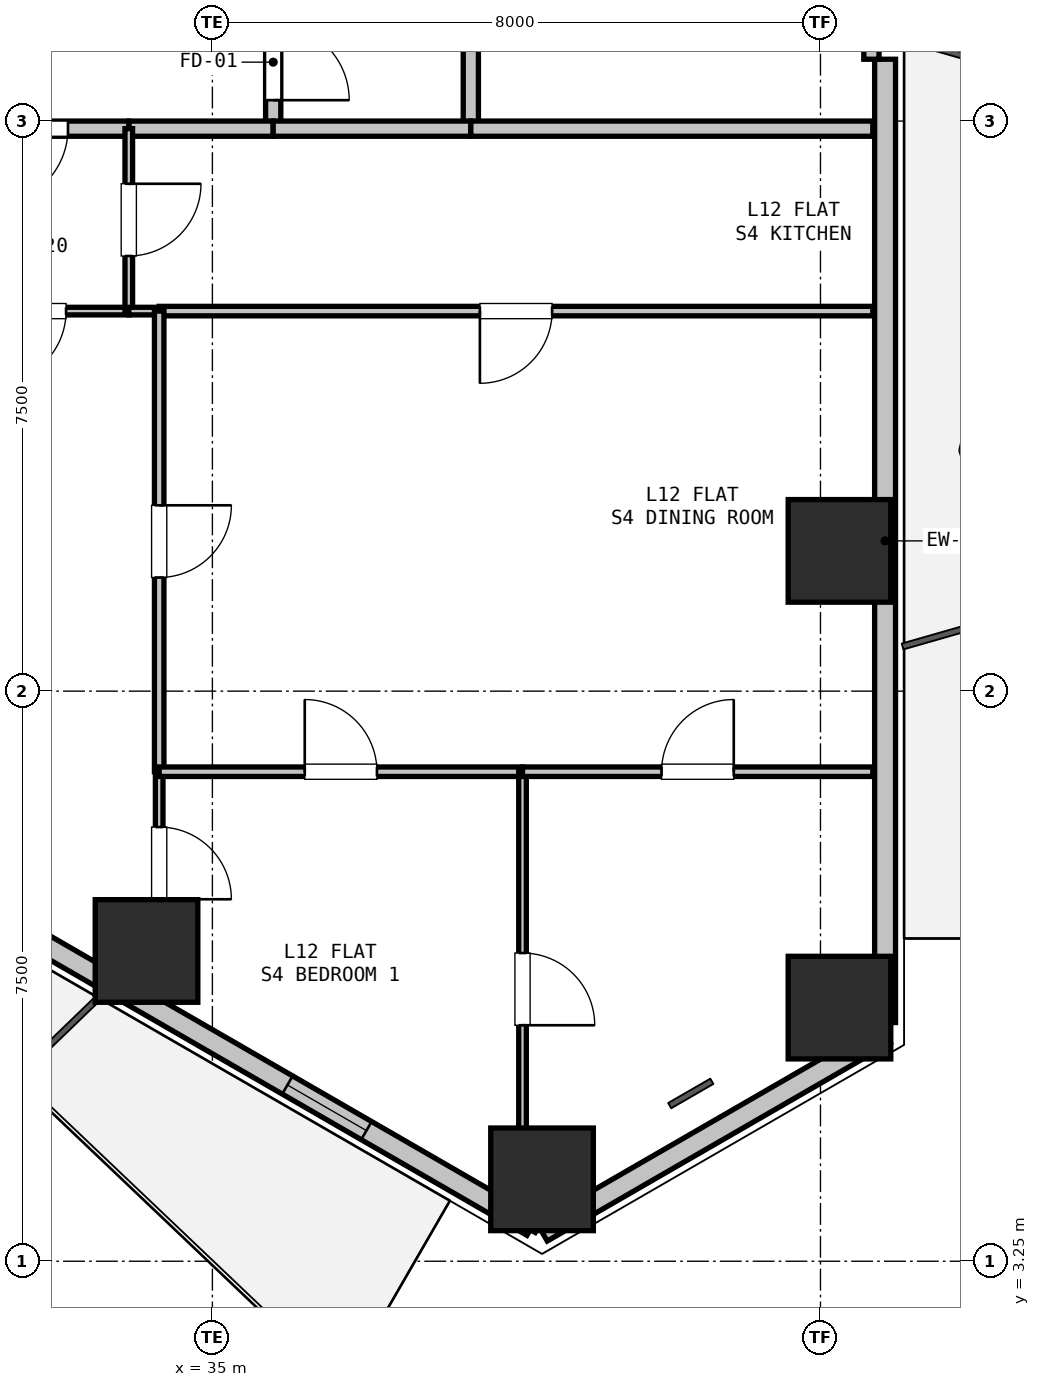
"""IFC4 building model, lengths in metres.
Left out: names, types, materials, properties, quantities, classifications, styles, units other than length and angle.
Written with IfcOpenShell. Run it as: python <this file> out.ifc"""

import sys

from ifc_helpers import new_model, si_unit, direction, frame, frame_2d, origin, origin_2d, place, context, subcontext, project, spatial, rectangle, hollow_rectangle, extrude, element, fill, save


model = new_model("IFC4")
c1 = context("Model", 3, precision=1e-05, world=origin(), true_north=direction((0.0, 1.0)))
c2 = subcontext(c1, "Body", "Model", "MODEL_VIEW")
j1 = project(units=[si_unit("LENGTHUNIT", "METRE"), si_unit("PLANEANGLEUNIT", "RADIAN")], contexts=[c1])
p1 = place(None, origin())
s1 = spatial("IfcSite", under=j1, at=p1, CompositionType="ELEMENT")
p2 = place(p1, origin())
s2 = spatial("IfcBuilding", under=s1, at=p2, CompositionType="ELEMENT")
p3 = place(p2, frame((0.0, 0.0, 45.6)))
s3 = spatial("IfcBuildingStorey", under=s2, at=p3, CompositionType="ELEMENT", Elevation=45.6)
for number, where, z_axis, x_axis in (
    (1, (43.25, 12.595, 0.0), (0.0, 0.0, 1.0), (1.0, 0.0, 0.0)),
    (2, (43.25, 6.587, 0.0), (0.0, 0.0, 1.0), (1.0, 0.0, 0.0)),
    (3, (39.337, 4.327, 0.0), (0.0, 0.0, 1.0), (1.0, 0.0, 0.0)),
    (4, (34.133, 7.332, 0.0), (0.0, 0.0, 1.0), (1.0, 0.0, 0.0)),
):
    element("IfcColumn", number, at=place(p3, frame(where, z_axis=z_axis, x_axis=x_axis)), inside=s3, PredefinedType="COLUMN", context=c2, shape_type="SweptSolid", body=[
        extrude(hollow_rectangle(XDim=1.35, YDim=1.35, WallThickness=0.036, at=origin_2d()), origin(), (0.0, 0.0, 1.0), 3.3),
    ])
p4 = place(p3, frame((43.85, 6.24, 0.0), z_axis=(0.0, 0.0, 1.0), x_axis=(-0.866043601342, -0.499968479581, 0.0)))
e5 = element("IfcWall", 5, at=p4, inside=s3, PredefinedType="SOLIDWALL", context=c2, shape_type="SweptSolid", body=[
    extrude(rectangle(XDim=5.211, YDim=0.275, at=frame_2d((2.605, 0.0))), origin(), (0.0, 0.0, 1.0), 2.66),
])
p5 = place(p3, frame((43.85, 19.063, 0.0), z_axis=(0.0, 0.0, 1.0), x_axis=(0.0, -1.0, 0.0)))
e6 = element("IfcWall", 6, at=p5, inside=s3, PredefinedType="SOLIDWALL", context=c2, shape_type="SweptSolid", body=[
    extrude(rectangle(XDim=12.673, YDim=0.275, at=frame_2d((6.336, 0.0))), origin(), (0.0, 0.0, 1.0), 2.66),
])
p6 = place(p3, frame((43.67, 20.763, 0.0), z_axis=(0.0, 0.0, 1.0), x_axis=(0.0, -1.0, 0.0)))
e7 = element("IfcWall", 7, at=p6, inside=s3, PredefinedType="PARAPET", context=c2, shape_type="SweptSolid", body=[
    extrude(rectangle(XDim=1.7, YDim=0.2, at=frame_2d((0.85, 0.0))), origin(), (0.0, 0.0, 1.0), 2.66),
])
p7 = place(p3, frame((39.207, 3.71, 0.0), z_axis=(0.0, 0.0, 1.0), x_axis=(-0.86603192154, 0.499988710747, 0.0)))
e8 = element("IfcWall", 8, at=p7, inside=s3, PredefinedType="SOLIDWALL", context=c2, shape_type="SweptSolid", body=[
    extrude(rectangle(XDim=12.673, YDim=0.275, at=frame_2d((6.336, 0.0))), origin(), (0.0, 0.0, 1.0), 2.66),
])
p8 = place(p7, frame((8.136, 0.0, 0.0)))
e9 = element("IfcOpeningElement", 9, at=p8, cuts=e8, PredefinedType="OPENING", context=c2, shape_type="SweptSolid", body=[
    extrude(rectangle(XDim=1.1, YDim=2.1, at=frame_2d((0.55, 1.05))), frame((0.0, 0.147, 0.0), z_axis=(0.0, -1.0, 0.0), x_axis=(1.0, 0.0, 0.0)), (0.0, 0.0, 1.0), 0.295),
])
p9 = place(p7, frame((2.518, 0.0, 0.9)))
e10 = element("IfcOpeningElement", 10, at=p9, cuts=e8, PredefinedType="OPENING", context=c2, shape_type="SweptSolid", body=[
    extrude(rectangle(XDim=1.2, YDim=1.4, at=frame_2d((0.6, 0.7))), frame((0.0, 0.147, 0.0), z_axis=(0.0, -1.0, 0.0), x_axis=(1.0, 0.0, 0.0)), (0.0, 0.0, 1.0), 0.295),
])
p10 = place(p3, frame((35.8, 19.9, 0.0), z_axis=(0.0, 0.0, 1.0), x_axis=(0.0, -1.0, 0.0)))
e11 = element("IfcWall", 11, at=p10, inside=s3, PredefinedType="PARTITIONING", context=c2, shape_type="SweptSolid", body=[
    extrude(rectangle(XDim=1.75, YDim=0.2, at=frame_2d((0.875, 0.0))), origin(), (0.0, 0.0, 1.0), 3.04),
])
p11 = place(p10, frame((0.375, 0.0, 0.0)))
e12 = element("IfcOpeningElement", 12, at=p11, cuts=e11, PredefinedType="OPENING", context=c2, shape_type="SweptSolid", body=[
    extrude(rectangle(XDim=1.0, YDim=2.15, at=frame_2d((0.5, 1.075))), frame((0.0, 0.11, 0.0), z_axis=(0.0, -1.0, 0.0), x_axis=(1.0, 0.0, 0.0)), (0.0, 0.0, 1.0), 0.22),
])
p12 = place(p3, frame((35.8, 18.15, 0.0), z_axis=(0.0, 0.0, 1.0), x_axis=(-1.0, 0.0, 0.0)))
e13 = element("IfcWall", 13, at=p12, inside=s3, PredefinedType="PARTITIONING", context=c2, shape_type="SweptSolid", body=[
    extrude(rectangle(XDim=1.9, YDim=0.2, at=frame_2d((0.95, 0.0))), origin(), (0.0, 0.0, 1.0), 3.04),
])
p13 = place(p3, frame((33.9, 18.15, 0.0), z_axis=(0.0, 0.0, 1.0), x_axis=(-1.0, 0.0, 0.0)))
e14 = element("IfcWall", 14, at=p13, inside=s3, PredefinedType="PARTITIONING", context=c2, shape_type="SweptSolid", body=[
    extrude(rectangle(XDim=2.6, YDim=0.2, at=frame_2d((1.3, 0.0))), origin(), (0.0, 0.0, 1.0), 3.04),
])
p14 = place(p13, frame((0.8, 0.0, 0.0)))
e15 = element("IfcOpeningElement", 15, at=p14, cuts=e14, PredefinedType="OPENING", context=c2, shape_type="SweptSolid", body=[
    extrude(rectangle(XDim=1.0, YDim=2.15, at=frame_2d((0.5, 1.075))), frame((0.0, 0.11, 0.0), z_axis=(0.0, -1.0, 0.0), x_axis=(1.0, 0.0, 0.0)), (0.0, 0.0, 1.0), 0.22),
])
p15 = place(p3, frame((38.4, 22.8, 0.0), z_axis=(0.0, 0.0, 1.0), x_axis=(0.0, -1.0, 0.0)))
e16 = element("IfcWall", 16, at=p15, inside=s3, PredefinedType="PARTITIONING", context=c2, shape_type="SweptSolid", body=[
    extrude(rectangle(XDim=4.65, YDim=0.2, at=frame_2d((2.325, 0.0))), origin(), (0.0, 0.0, 1.0), 3.04),
])
p16 = place(p15, frame((1.9, 0.0, 0.0)))
e17 = element("IfcOpeningElement", 17, at=p16, cuts=e16, PredefinedType="OPENING", context=c2, shape_type="SweptSolid", body=[
    extrude(rectangle(XDim=0.85, YDim=2.1, at=frame_2d((0.425, 1.05))), frame((0.0, 0.11, 0.0), z_axis=(0.0, -1.0, 0.0), x_axis=(1.0, 0.0, 0.0)), (0.0, 0.0, 1.0), 0.22),
])
p17 = place(p3, frame((38.4, 18.15, 0.0), z_axis=(0.0, 0.0, 1.0), x_axis=(-1.0, 0.0, 0.0)))
e18 = element("IfcWall", 18, at=p17, inside=s3, PredefinedType="PARTITIONING", context=c2, shape_type="SweptSolid", body=[
    extrude(rectangle(XDim=2.6, YDim=0.2, at=frame_2d((1.3, 0.0))), origin(), (0.0, 0.0, 1.0), 2.337),
])
p18 = place(p3, frame((33.9, 15.75, 0.0), z_axis=(0.0, 0.0, 1.0), x_axis=(-1.0, 0.0, 0.0)))
e19 = element("IfcWall", 19, at=p18, inside=s3, PredefinedType="PARTITIONING", context=c2, shape_type="SweptSolid", body=[
    extrude(rectangle(XDim=2.6, YDim=0.1, at=frame_2d((1.3, 0.0))), origin(), (0.0, 0.0, 1.0), 3.04),
])
p19 = place(p18, frame((0.825, 0.0, 0.0)))
e20 = element("IfcOpeningElement", 20, at=p19, cuts=e19, PredefinedType="OPENING", context=c2, shape_type="SweptSolid", body=[
    extrude(rectangle(XDim=0.95, YDim=2.1, at=frame_2d((0.475, 1.05))), frame((0.0, 0.06, 0.0), z_axis=(0.0, -1.0, 0.0), x_axis=(1.0, 0.0, 0.0)), (0.0, 0.0, 1.0), 0.12),
])
p20 = place(p3, frame((33.9, 18.15, 0.0), z_axis=(0.0, 0.0, 1.0), x_axis=(0.0, -1.0, 0.0)))
e21 = element("IfcWall", 21, at=p20, inside=s3, PredefinedType="PARTITIONING", context=c2, shape_type="SweptSolid", body=[
    extrude(rectangle(XDim=2.4, YDim=0.1, at=frame_2d((1.2, 0.0))), origin(), (0.0, 0.0, 1.0), 3.04),
])
p21 = place(p20, frame((0.725, 0.0, 0.0)))
e22 = element("IfcOpeningElement", 22, at=p21, cuts=e21, PredefinedType="OPENING", context=c2, shape_type="SweptSolid", body=[
    extrude(rectangle(XDim=0.95, YDim=2.1, at=frame_2d((0.475, 1.05))), frame((0.0, 0.06, 0.0), z_axis=(0.0, -1.0, 0.0), x_axis=(1.0, 0.0, 0.0)), (0.0, 0.0, 1.0), 0.12),
])
p22 = place(p3, frame((38.4, 18.15, 0.0), z_axis=(0.0, 0.0, 1.0), x_axis=(1.0, 0.0, 0.0)))
e23 = element("IfcWall", 23, at=p22, inside=s3, PredefinedType="PARTITIONING", context=c2, shape_type="SweptSolid", body=[
    extrude(rectangle(XDim=5.289, YDim=0.2, at=frame_2d((2.644, 0.0))), origin(), (0.0, 0.0, 1.0), 2.365),
])
p23 = place(p3, frame((43.688, 15.75, 0.0), z_axis=(0.0, 0.0, 1.0), x_axis=(-1.0, 0.0, 0.0)))
e24 = element("IfcWall", 24, at=p23, inside=s3, PredefinedType="PARTITIONING", context=c2, shape_type="SweptSolid", body=[
    extrude(rectangle(XDim=9.388, YDim=0.125, at=frame_2d((4.694, 0.0))), origin(), (0.0, 0.0, 1.0), 2.337),
])
p24 = place(p23, frame((4.219, 0.0, 0.0)))
e25 = element("IfcOpeningElement", 25, at=p24, cuts=e24, PredefinedType="OPENING", context=c2, shape_type="SweptSolid", body=[
    extrude(rectangle(XDim=0.95, YDim=2.1, at=frame_2d((0.475, 1.05))), frame((0.0, 0.073, 0.0), z_axis=(0.0, -1.0, 0.0), x_axis=(1.0, 0.0, 0.0)), (0.0, 0.0, 1.0), 0.145),
])
p25 = place(p3, frame((34.3, 15.75, 0.0), z_axis=(0.0, 0.0, 1.0), x_axis=(-1.0, 0.0, 0.0)))
e26 = element("IfcWall", 26, at=p25, inside=s3, PredefinedType="PARTITIONING", context=c2, shape_type="SweptSolid", body=[
    extrude(rectangle(XDim=0.4, YDim=0.1, at=frame_2d((0.2, 0.0))), origin(), (0.0, 0.0, 1.0), 3.04),
])
p26 = place(p3, frame((34.3, 15.75, 0.0), z_axis=(0.0, 0.0, 1.0), x_axis=(0.0, -1.0, 0.0)))
e27 = element("IfcWall", 27, at=p26, inside=s3, PredefinedType="PARTITIONING", context=c2, shape_type="SweptSolid", body=[
    extrude(rectangle(XDim=6.06, YDim=0.125, at=frame_2d((3.03, 0.0))), origin(), (0.0, 0.0, 1.0), 3.04),
])
p27 = place(p26, frame((2.555, 0.0, 0.0)))
e28 = element("IfcOpeningElement", 28, at=p27, cuts=e27, PredefinedType="OPENING", context=c2, shape_type="SweptSolid", body=[
    extrude(rectangle(XDim=0.95, YDim=2.1, at=frame_2d((0.475, 1.05))), frame((0.0, 0.073, 0.0), z_axis=(0.0, -1.0, 0.0), x_axis=(1.0, 0.0, 0.0)), (0.0, 0.0, 1.0), 0.145),
])
p28 = place(p3, frame((34.3, 9.69, 0.0), z_axis=(0.0, 0.0, 1.0), x_axis=(0.0, -1.0, 0.0)))
e29 = element("IfcWall", 29, at=p28, inside=s3, PredefinedType="PARTITIONING", context=c2, shape_type="SweptSolid", body=[
    extrude(rectangle(XDim=2.961, YDim=0.1, at=frame_2d((1.48, 0.0))), origin(), (0.0, 0.0, 1.0), 3.04),
])
p29 = place(p28, frame((0.728, 0.0, 0.0)))
e30 = element("IfcOpeningElement", 30, at=p29, cuts=e29, PredefinedType="OPENING", context=c2, shape_type="SweptSolid", body=[
    extrude(rectangle(XDim=0.95, YDim=2.1, at=frame_2d((0.475, 1.05))), frame((0.0, 0.06, 0.0), z_axis=(0.0, -1.0, 0.0), x_axis=(1.0, 0.0, 0.0)), (0.0, 0.0, 1.0), 0.12),
])
p30 = place(p3, frame((34.3, 9.69, 0.0), z_axis=(0.0, 0.0, 1.0), x_axis=(1.0, 0.0, 0.0)))
e31 = element("IfcWall", 31, at=p30, inside=s3, PredefinedType="PARTITIONING", context=c2, shape_type="SweptSolid", body=[
    extrude(rectangle(XDim=4.78, YDim=0.125, at=frame_2d((2.39, 0.0))), origin(), (0.0, 0.0, 1.0), 3.04),
])
p31 = place(p30, frame((1.915, 0.0, 0.0)))
e32 = element("IfcOpeningElement", 32, at=p31, cuts=e31, PredefinedType="OPENING", context=c2, shape_type="SweptSolid", body=[
    extrude(rectangle(XDim=0.95, YDim=2.1, at=frame_2d((0.475, 1.05))), frame((0.0, 0.073, 0.0), z_axis=(0.0, -1.0, 0.0), x_axis=(1.0, 0.0, 0.0)), (0.0, 0.0, 1.0), 0.145),
])
p32 = place(p3, frame((39.08, 9.69, 0.0), z_axis=(0.0, 0.0, 1.0), x_axis=(0.0, -1.0, 0.0)))
e33 = element("IfcWall", 33, at=p32, inside=s3, PredefinedType="PARTITIONING", context=c2, shape_type="SweptSolid", body=[
    extrude(rectangle(XDim=5.72, YDim=0.1, at=frame_2d((2.86, 0.0))), origin(), (0.0, 0.0, 1.0), 3.04),
])
p33 = place(p32, frame((2.385, 0.0, 0.0)))
e34 = element("IfcOpeningElement", 34, at=p33, cuts=e33, PredefinedType="OPENING", context=c2, shape_type="SweptSolid", body=[
    extrude(rectangle(XDim=0.95, YDim=2.1, at=frame_2d((0.475, 1.05))), frame((0.0, 0.06, 0.0), z_axis=(0.0, -1.0, 0.0), x_axis=(1.0, 0.0, 0.0)), (0.0, 0.0, 1.0), 0.12),
])
p34 = place(p3, frame((39.08, 9.69, 0.0), z_axis=(0.0, 0.0, 1.0), x_axis=(1.0, 0.0, 0.0)))
e35 = element("IfcWall", 35, at=p34, inside=s3, PredefinedType="PARTITIONING", context=c2, shape_type="SweptSolid", body=[
    extrude(rectangle(XDim=4.608, YDim=0.125, at=frame_2d((2.304, 0.0))), origin(), (0.0, 0.0, 1.0), 2.337),
])
p35 = place(p34, frame((1.829, 0.0, 0.0)))
e36 = element("IfcOpeningElement", 36, at=p35, cuts=e35, PredefinedType="OPENING", context=c2, shape_type="SweptSolid", body=[
    extrude(rectangle(XDim=0.95, YDim=2.1, at=frame_2d((0.475, 1.05))), frame((0.0, 0.073, 0.0), z_axis=(0.0, -1.0, 0.0), x_axis=(1.0, 0.0, 0.0)), (0.0, 0.0, 1.0), 0.145),
])
p36 = place(p3, frame((39.272, 3.672, 0.0), z_axis=(0.0, 0.0, 1.0), x_axis=(-0.866442544969, 0.49927679324, 0.0)))
e37 = element("IfcWall", 37, at=p36, inside=s3, PredefinedType="PARTITIONING", context=c2, shape_type="SweptSolid", body=[
    extrude(rectangle(XDim=0.142, YDim=0.1, at=frame_2d((0.071, 0.0))), origin(), (0.0, 0.0, 1.0), 3.04),
])
p37 = place(p9, origin())
e38 = element("IfcWindow", 38, at=p37, inside=s3, PartitioningType="SINGLE_PANEL", PredefinedType="WINDOW", context=c2, shape_type="SweptSolid", body=[
    extrude(rectangle(XDim=1.2, YDim=1.4, at=frame_2d((0.6, 0.7))), frame((0.0, 0.03, 0.0), z_axis=(0.0, -1.0, 0.0), x_axis=(1.0, 0.0, 0.0)), (0.0, 0.0, 1.0), 0.06),
])
fill(e10, e38)
p38 = place(p11, origin())
e39 = element("IfcDoor", 39, at=p38, inside=s3, OperationType="SINGLE_SWING_RIGHT", PredefinedType="DOOR", context=c2, shape_type="SweptSolid", body=[
    extrude(rectangle(XDim=1.0, YDim=2.15, at=frame_2d((0.5, 1.075))), frame((0.0, 0.025, 0.0), z_axis=(0.0, -1.0, 0.0), x_axis=(1.0, 0.0, 0.0)), (0.0, 0.0, 1.0), 0.05),
])
fill(e12, e39)
p39 = place(p14, origin())
e40 = element("IfcDoor", 40, at=p39, inside=s3, OperationType="SINGLE_SWING_RIGHT", PredefinedType="DOOR", context=c2, shape_type="SweptSolid", body=[
    extrude(rectangle(XDim=1.0, YDim=2.15, at=frame_2d((0.5, 1.075))), frame((0.0, 0.025, 0.0), z_axis=(0.0, -1.0, 0.0), x_axis=(1.0, 0.0, 0.0)), (0.0, 0.0, 1.0), 0.05),
])
fill(e15, e40)
p40 = place(p21, origin())
e41 = element("IfcDoor", 41, at=p40, inside=s3, OperationType="SINGLE_SWING_LEFT", PredefinedType="DOOR", context=c2, shape_type="SweptSolid", body=[
    extrude(rectangle(XDim=0.95, YDim=2.1, at=frame_2d((0.475, 1.05))), frame((0.0, 0.025, 0.0), z_axis=(0.0, -1.0, 0.0), x_axis=(1.0, 0.0, 0.0)), (0.0, 0.0, 1.0), 0.05),
])
fill(e22, e41)
p41 = place(p19, origin())
e42 = element("IfcDoor", 42, at=p41, inside=s3, OperationType="SINGLE_SWING_RIGHT", PredefinedType="DOOR", context=c2, shape_type="SweptSolid", body=[
    extrude(rectangle(XDim=0.95, YDim=2.1, at=frame_2d((0.475, 1.05))), frame((0.0, 0.025, 0.0), z_axis=(0.0, -1.0, 0.0), x_axis=(1.0, 0.0, 0.0)), (0.0, 0.0, 1.0), 0.05),
])
fill(e20, e42)
p42 = place(p24, origin())
e43 = element("IfcDoor", 43, at=p42, inside=s3, OperationType="SINGLE_SWING_RIGHT", PredefinedType="DOOR", context=c2, shape_type="SweptSolid", body=[
    extrude(rectangle(XDim=0.95, YDim=2.1, at=frame_2d((0.475, 1.05))), frame((0.0, 0.025, 0.0), z_axis=(0.0, -1.0, 0.0), x_axis=(1.0, 0.0, 0.0)), (0.0, 0.0, 1.0), 0.05),
])
fill(e25, e43)
p43 = place(p29, origin())
e44 = element("IfcDoor", 44, at=p43, inside=s3, OperationType="SINGLE_SWING_RIGHT", PredefinedType="DOOR", context=c2, shape_type="SweptSolid", body=[
    extrude(rectangle(XDim=0.95, YDim=2.1, at=frame_2d((0.475, 1.05))), frame((0.0, 0.025, 0.0), z_axis=(0.0, -1.0, 0.0), x_axis=(1.0, 0.0, 0.0)), (0.0, 0.0, 1.0), 0.05),
])
fill(e30, e44)
p44 = place(p27, origin())
e45 = element("IfcDoor", 45, at=p44, inside=s3, OperationType="SINGLE_SWING_LEFT", PredefinedType="DOOR", context=c2, shape_type="SweptSolid", body=[
    extrude(rectangle(XDim=0.95, YDim=2.1, at=frame_2d((0.475, 1.05))), frame((0.0, 0.025, 0.0), z_axis=(0.0, -1.0, 0.0), x_axis=(1.0, 0.0, 0.0)), (0.0, 0.0, 1.0), 0.05),
])
fill(e28, e45)
p45 = place(p33, origin())
e46 = element("IfcDoor", 46, at=p45, inside=s3, OperationType="SINGLE_SWING_RIGHT", PredefinedType="DOOR", context=c2, shape_type="SweptSolid", body=[
    extrude(rectangle(XDim=0.95, YDim=2.1, at=frame_2d((0.475, 1.05))), frame((0.0, 0.025, 0.0), z_axis=(0.0, -1.0, 0.0), x_axis=(1.0, 0.0, 0.0)), (0.0, 0.0, 1.0), 0.05),
])
fill(e34, e46)
p46 = place(p31, origin())
e47 = element("IfcDoor", 47, at=p46, inside=s3, OperationType="SINGLE_SWING_LEFT", PredefinedType="DOOR", context=c2, shape_type="SweptSolid", body=[
    extrude(rectangle(XDim=0.95, YDim=2.1, at=frame_2d((0.475, 1.05))), frame((0.0, 0.025, 0.0), z_axis=(0.0, -1.0, 0.0), x_axis=(1.0, 0.0, 0.0)), (0.0, 0.0, 1.0), 0.05),
])
fill(e32, e47)
p47 = place(p35, origin())
e48 = element("IfcDoor", 48, at=p47, inside=s3, OperationType="SINGLE_SWING_RIGHT", PredefinedType="DOOR", context=c2, shape_type="SweptSolid", body=[
    extrude(rectangle(XDim=0.95, YDim=2.1, at=frame_2d((0.475, 1.05))), frame((0.0, 0.025, 0.0), z_axis=(0.0, -1.0, 0.0), x_axis=(1.0, 0.0, 0.0)), (0.0, 0.0, 1.0), 0.05),
])
fill(e36, e48)
save(model, sys.argv[1])
